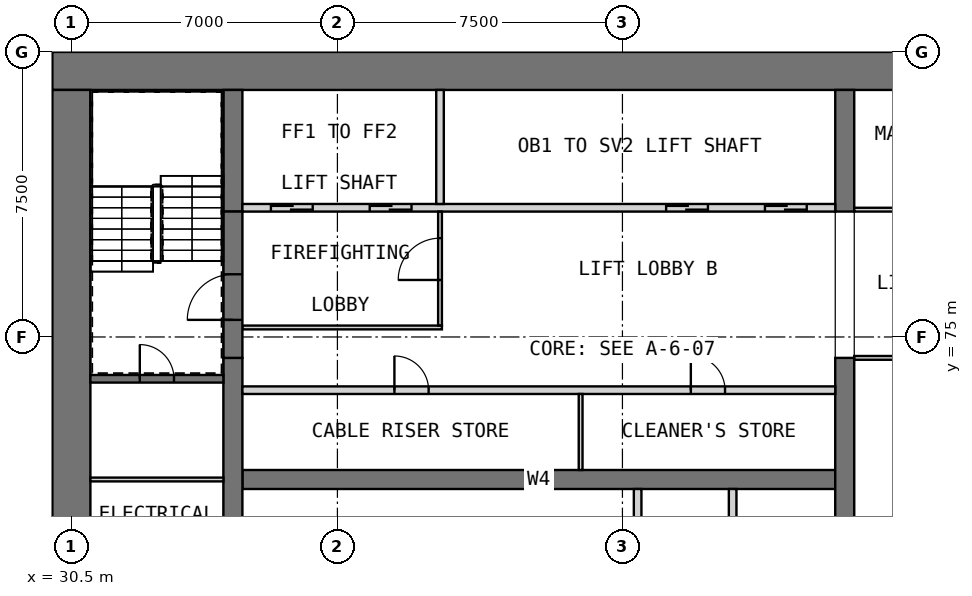
"""IFC4 building model, lengths in metres.
Left out: names, types, materials, properties, quantities, classifications, styles, units other than length and angle.
Written with IfcOpenShell. Run it as: python <this file> out.ifc"""

import sys

from ifc_helpers import new_model, si_unit, direction, frame, frame_2d, origin, place, context, subcontext, project, spatial, rectangle, extrude, element, fill, save


model = new_model("IFC4")
c1 = context("Model", 3, precision=1e-05, world=origin(), true_north=direction((0.0, 1.0)))
c2 = subcontext(c1, "Body", "Model", "MODEL_VIEW")
j1 = project(units=[si_unit("LENGTHUNIT", "METRE"), si_unit("PLANEANGLEUNIT", "RADIAN")], contexts=[c1])
p1 = place(None, origin())
s1 = spatial("IfcSite", under=j1, at=p1, CompositionType="ELEMENT")
p2 = place(p1, origin())
s2 = spatial("IfcBuilding", under=s1, at=p2, CompositionType="ELEMENT")
p3 = place(p2, frame((0.0, 0.0, 23.5)))
s3 = spatial("IfcBuildingStorey", under=s2, at=p3, CompositionType="ELEMENT", Elevation=23.5)
p4 = place(p3, frame((30.0, 82.0, 0.0), z_axis=(0.0, 0.0, 1.0), x_axis=(1.0, 0.0, 0.0)))
e1 = element("IfcWall", 1, at=p4, inside=s3, PredefinedType="SHEAR", context=c2, shape_type="SweptSolid", body=[
    extrude(rectangle(XDim=30.0, YDim=1.0, at=frame_2d((15.0, 0.0))), origin(), (0.0, 0.0, 1.0), 5.5),
])
p5 = place(p3, frame((30.5, 61.0, 0.0), z_axis=(0.0, 0.0, 1.0), x_axis=(0.0, 1.0, 0.0)))
e2 = element("IfcWall", 2, at=p5, inside=s3, PredefinedType="SHEAR", context=c2, shape_type="SweptSolid", body=[
    extrude(rectangle(XDim=20.5, YDim=1.0, at=frame_2d((10.25, 0.0))), origin(), (0.0, 0.0, 1.0), 5.5),
])
p6 = place(p3, frame((35.0, 71.25, 0.0), z_axis=(0.0, 0.0, 1.0), x_axis=(1.0, 0.0, 0.0)))
e3 = element("IfcWall", 3, at=p6, inside=s3, PredefinedType="SHEAR", context=c2, shape_type="SweptSolid", body=[
    extrude(rectangle(XDim=15.6, YDim=0.5, at=frame_2d((7.8, 0.0))), origin(), (0.0, 0.0, 1.0), 5.5),
])
p7 = place(p3, frame((34.75, 68.05, 0.0), z_axis=(0.0, 0.0, 1.0), x_axis=(0.0, 1.0, 0.0)))
e4 = element("IfcWall", 4, at=p7, inside=s3, PredefinedType="SHEAR", context=c2, shape_type="SweptSolid", body=[
    extrude(rectangle(XDim=6.4, YDim=0.5, at=frame_2d((3.2, 0.0))), origin(), (0.0, 0.0, 1.0), 5.5),
])
p8 = place(p3, frame((34.75, 78.3, 0.0), z_axis=(0.0, 0.0, 1.0), x_axis=(0.0, 1.0, 0.0)))
e5 = element("IfcWall", 5, at=p8, inside=s3, PredefinedType="SHEAR", context=c2, shape_type="SweptSolid", body=[
    extrude(rectangle(XDim=3.2, YDim=0.5, at=frame_2d((1.6, 0.0))), origin(), (0.0, 0.0, 1.0), 5.5),
])
p9 = place(p3, frame((50.85, 68.05, 0.0), z_axis=(0.0, 0.0, 1.0), x_axis=(0.0, 1.0, 0.0)))
e6 = element("IfcWall", 6, at=p9, inside=s3, PredefinedType="SHEAR", context=c2, shape_type="SweptSolid", body=[
    extrude(rectangle(XDim=6.4, YDim=0.5, at=frame_2d((3.2, 0.0))), origin(), (0.0, 0.0, 1.0), 5.5),
])
p10 = place(p3, frame((50.85, 78.3, 0.0), z_axis=(0.0, 0.0, 1.0), x_axis=(0.0, 1.0, 0.0)))
e7 = element("IfcWall", 7, at=p10, inside=s3, PredefinedType="SHEAR", context=c2, shape_type="SweptSolid", body=[
    extrude(rectangle(XDim=3.2, YDim=0.5, at=frame_2d((1.6, 0.0))), origin(), (0.0, 0.0, 1.0), 5.5),
])
for number, where, z_axis, x_axis in (
    (8, (45.4, 68.25, 0.0), (0.0, 0.0, 1.0), (0.0, 1.0, 0.0)),
    (9, (47.9, 68.25, 0.0), (0.0, 0.0, 1.0), (0.0, 1.0, 0.0)),
):
    element("IfcWall", number, at=place(p3, frame(where, z_axis=z_axis, x_axis=x_axis)), inside=s3, PredefinedType="SOLIDWALL", context=c2, shape_type="SweptSolid", body=[
        extrude(rectangle(XDim=2.75, YDim=0.2, at=frame_2d((1.375, 0.0))), origin(), (0.0, 0.0, 1.0), 5.5),
    ])
p11 = place(p3, frame((35.0, 73.6, 0.0), z_axis=(0.0, 0.0, 1.0), x_axis=(1.0, 0.0, 0.0)))
e10 = element("IfcWall", 10, at=p11, inside=s3, PredefinedType="PARTITIONING", context=c2, shape_type="SweptSolid", body=[
    extrude(rectangle(XDim=15.6, YDim=0.2, at=frame_2d((7.8, 0.0))), origin(), (0.0, 0.0, 1.0), 5.2),
])
p12 = place(p11, frame((4.0, 0.0, 0.0)))
e11 = element("IfcOpeningElement", 11, at=p12, cuts=e10, PredefinedType="OPENING", context=c2, shape_type="SweptSolid", body=[
    extrude(rectangle(XDim=0.9, YDim=2.1, at=frame_2d((0.45, 1.05))), frame((0.0, 0.11, 0.0), z_axis=(0.0, -1.0, 0.0), x_axis=(1.0, 0.0, 0.0)), (0.0, 0.0, 1.0), 0.22),
])
p13 = place(p11, frame((11.8, 0.0, 0.0)))
e12 = element("IfcOpeningElement", 12, at=p13, cuts=e10, PredefinedType="OPENING", context=c2, shape_type="SweptSolid", body=[
    extrude(rectangle(XDim=0.9, YDim=2.1, at=frame_2d((0.45, 1.05))), frame((0.0, 0.11, 0.0), z_axis=(0.0, -1.0, 0.0), x_axis=(1.0, 0.0, 0.0)), (0.0, 0.0, 1.0), 0.22),
])
p14 = place(p3, frame((43.9, 71.5, 0.0), z_axis=(0.0, 0.0, 1.0), x_axis=(0.0, 1.0, 0.0)))
e13 = element("IfcWall", 13, at=p14, inside=s3, PredefinedType="PARTITIONING", context=c2, shape_type="SweptSolid", body=[
    extrude(rectangle(XDim=2.0, YDim=0.1, at=frame_2d((1.0, 0.0))), origin(), (0.0, 0.0, 1.0), 5.2),
])
p15 = place(p3, frame((35.0, 78.4, 0.0), z_axis=(0.0, 0.0, 1.0), x_axis=(1.0, 0.0, 0.0)))
e14 = element("IfcWall", 14, at=p15, inside=s3, PredefinedType="SOLIDWALL", context=c2, shape_type="SweptSolid", body=[
    extrude(rectangle(XDim=15.6, YDim=0.2, at=frame_2d((7.8, 0.0))), origin(), (0.0, 0.0, 1.0), 5.5),
])
p16 = place(p15, frame((0.75, 0.0, 0.0)))
e15 = element("IfcOpeningElement", 15, at=p16, cuts=e14, PredefinedType="OPENING", context=c2, shape_type="SweptSolid", body=[
    extrude(rectangle(XDim=1.1, YDim=2.1, at=frame_2d((0.55, 1.05))), frame((0.0, 0.11, 0.0), z_axis=(0.0, -1.0, 0.0), x_axis=(1.0, 0.0, 0.0)), (0.0, 0.0, 1.0), 0.22),
])
p17 = place(p15, frame((3.35, 0.0, 0.0)))
e16 = element("IfcOpeningElement", 16, at=p17, cuts=e14, PredefinedType="OPENING", context=c2, shape_type="SweptSolid", body=[
    extrude(rectangle(XDim=1.1, YDim=2.1, at=frame_2d((0.55, 1.05))), frame((0.0, 0.11, 0.0), z_axis=(0.0, -1.0, 0.0), x_axis=(1.0, 0.0, 0.0)), (0.0, 0.0, 1.0), 0.22),
])
p18 = place(p15, frame((11.15, 0.0, 0.0)))
e17 = element("IfcOpeningElement", 17, at=p18, cuts=e14, PredefinedType="OPENING", context=c2, shape_type="SweptSolid", body=[
    extrude(rectangle(XDim=1.1, YDim=2.1, at=frame_2d((0.55, 1.05))), frame((0.0, 0.11, 0.0), z_axis=(0.0, -1.0, 0.0), x_axis=(1.0, 0.0, 0.0)), (0.0, 0.0, 1.0), 0.22),
])
p19 = place(p15, frame((13.75, 0.0, 0.0)))
e18 = element("IfcOpeningElement", 18, at=p19, cuts=e14, PredefinedType="OPENING", context=c2, shape_type="SweptSolid", body=[
    extrude(rectangle(XDim=1.1, YDim=2.1, at=frame_2d((0.55, 1.05))), frame((0.0, 0.11, 0.0), z_axis=(0.0, -1.0, 0.0), x_axis=(1.0, 0.0, 0.0)), (0.0, 0.0, 1.0), 0.22),
])
p20 = place(p3, frame((40.2, 78.5, 0.0), z_axis=(0.0, 0.0, 1.0), x_axis=(0.0, 1.0, 0.0)))
e19 = element("IfcWall", 19, at=p20, inside=s3, PredefinedType="SOLIDWALL", context=c2, shape_type="SweptSolid", body=[
    extrude(rectangle(XDim=3.0, YDim=0.2, at=frame_2d((1.5, 0.0))), origin(), (0.0, 0.0, 1.0), 5.5),
])
p21 = place(p3, frame((35.0, 75.25, 0.0), z_axis=(0.0, 0.0, 1.0), x_axis=(1.0, 0.0, 0.0)))
e20 = element("IfcWall", 20, at=p21, inside=s3, PredefinedType="PARTITIONING", context=c2, shape_type="SweptSolid", body=[
    extrude(rectangle(XDim=5.25, YDim=0.1, at=frame_2d((2.625, 0.0))), origin(), (0.0, 0.0, 1.0), 5.2),
])
p22 = place(p3, frame((40.2, 75.3, 0.0), z_axis=(0.0, 0.0, 1.0), x_axis=(0.0, 1.0, 0.0)))
e21 = element("IfcWall", 21, at=p22, inside=s3, PredefinedType="PARTITIONING", context=c2, shape_type="SweptSolid", body=[
    extrude(rectangle(XDim=3.0, YDim=0.1, at=frame_2d((1.5, 0.0))), origin(), (0.0, 0.0, 1.0), 5.2),
])
p23 = place(p22, frame((1.2, 0.0, 0.0)))
e22 = element("IfcOpeningElement", 22, at=p23, cuts=e21, PredefinedType="OPENING", context=c2, shape_type="SweptSolid", body=[
    extrude(rectangle(XDim=1.1, YDim=2.1, at=frame_2d((0.55, 1.05))), frame((0.0, 0.06, 0.0), z_axis=(0.0, -1.0, 0.0), x_axis=(1.0, 0.0, 0.0)), (0.0, 0.0, 1.0), 0.12),
])
p24 = place(p3, frame((34.75, 74.45, 0.0), z_axis=(0.0, 0.0, 1.0), x_axis=(0.0, 1.0, 0.0)))
e23 = element("IfcWall", 23, at=p24, inside=s3, PredefinedType="SOLIDWALL", context=c2, shape_type="SweptSolid", body=[
    extrude(rectangle(XDim=3.85, YDim=0.5, at=frame_2d((1.925, 0.0))), origin(), (0.0, 0.0, 1.0), 4.3),
])
p25 = place(p24, frame((1.0, 0.0, 0.0)))
e24 = element("IfcOpeningElement", 24, at=p25, cuts=e23, PredefinedType="OPENING", context=c2, shape_type="SweptSolid", body=[
    extrude(rectangle(XDim=1.2, YDim=2.1, at=frame_2d((0.6, 1.05))), frame((0.0, 0.26, 0.0), z_axis=(0.0, -1.0, 0.0), x_axis=(1.0, 0.0, 0.0)), (0.0, 0.0, 1.0), 0.52),
])
p26 = place(p3, frame((31.0, 73.9, 0.0), z_axis=(0.0, 0.0, 1.0), x_axis=(1.0, 0.0, 0.0)))
e25 = element("IfcWall", 25, at=p26, inside=s3, PredefinedType="SOLIDWALL", context=c2, shape_type="SweptSolid", body=[
    extrude(rectangle(XDim=3.5, YDim=0.2, at=frame_2d((1.75, 0.0))), origin(), (0.0, 0.0, 1.0), 5.2),
])
p27 = place(p26, frame((1.3, 0.0, 0.0)))
e26 = element("IfcOpeningElement", 26, at=p27, cuts=e25, PredefinedType="OPENING", context=c2, shape_type="SweptSolid", body=[
    extrude(rectangle(XDim=0.9, YDim=2.1, at=frame_2d((0.45, 1.05))), frame((0.0, 0.11, 0.0), z_axis=(0.0, -1.0, 0.0), x_axis=(1.0, 0.0, 0.0)), (0.0, 0.0, 1.0), 0.22),
])
p28 = place(p3, frame((31.0, 71.25, 0.0), z_axis=(0.0, 0.0, 1.0), x_axis=(1.0, 0.0, 0.0)))
e27 = element("IfcWall", 27, at=p28, inside=s3, PredefinedType="PARTITIONING", context=c2, shape_type="SweptSolid", body=[
    extrude(rectangle(XDim=3.5, YDim=0.1, at=frame_2d((1.75, 0.0))), origin(), (0.0, 0.0, 1.0), 5.2),
])
p29 = place(p3, frame((51.1, 74.45, 0.0), z_axis=(0.0, 0.0, 1.0), x_axis=(1.0, 0.0, 0.0)))
e28 = element("IfcWall", 28, at=p29, inside=s3, PredefinedType="PARTITIONING", context=c2, shape_type="SweptSolid", body=[
    extrude(rectangle(XDim=7.9, YDim=0.1, at=frame_2d((3.95, 0.0))), origin(), (0.0, 0.0, 1.0), 5.2),
])
p30 = place(p29, frame((3.5, 0.0, 0.0)))
e29 = element("IfcOpeningElement", 29, at=p30, cuts=e28, PredefinedType="OPENING", context=c2, shape_type="SweptSolid", body=[
    extrude(rectangle(XDim=0.9, YDim=2.1, at=frame_2d((0.45, 1.05))), frame((0.0, 0.06, 0.0), z_axis=(0.0, -1.0, 0.0), x_axis=(1.0, 0.0, 0.0)), (0.0, 0.0, 1.0), 0.12),
])
p31 = place(p3, frame((51.1, 78.35, 0.0), z_axis=(0.0, 0.0, 1.0), x_axis=(1.0, 0.0, 0.0)))
e30 = element("IfcWall", 30, at=p31, inside=s3, PredefinedType="PARTITIONING", context=c2, shape_type="SweptSolid", body=[
    extrude(rectangle(XDim=7.9, YDim=0.1, at=frame_2d((3.95, 0.0))), origin(), (0.0, 0.0, 1.0), 5.2),
])
p32 = place(p31, frame((1.8, 0.0, 0.0)))
e31 = element("IfcOpeningElement", 31, at=p32, cuts=e30, PredefinedType="OPENING", context=c2, shape_type="SweptSolid", body=[
    extrude(rectangle(XDim=0.9, YDim=2.1, at=frame_2d((0.45, 1.05))), frame((0.0, 0.06, 0.0), z_axis=(0.0, -1.0, 0.0), x_axis=(1.0, 0.0, 0.0)), (0.0, 0.0, 1.0), 0.12),
])
p33 = place(p31, frame((5.75, 0.0, 0.0)))
e32 = element("IfcOpeningElement", 32, at=p33, cuts=e30, PredefinedType="OPENING", context=c2, shape_type="SweptSolid", body=[
    extrude(rectangle(XDim=0.9, YDim=2.1, at=frame_2d((0.45, 1.05))), frame((0.0, 0.06, 0.0), z_axis=(0.0, -1.0, 0.0), x_axis=(1.0, 0.0, 0.0)), (0.0, 0.0, 1.0), 0.12),
])
p34 = place(p12, origin())
e33 = element("IfcDoor", 33, at=p34, inside=s3, OperationType="SINGLE_SWING_RIGHT", PredefinedType="DOOR", context=c2, shape_type="SweptSolid", body=[
    extrude(rectangle(XDim=0.9, YDim=2.1, at=frame_2d((0.45, 1.05))), frame((0.0, 0.025, 0.0), z_axis=(0.0, -1.0, 0.0), x_axis=(1.0, 0.0, 0.0)), (0.0, 0.0, 1.0), 0.05),
])
fill(e11, e33)
p35 = place(p13, origin())
e34 = element("IfcDoor", 34, at=p35, inside=s3, OperationType="SINGLE_SWING_LEFT", PredefinedType="DOOR", context=c2, shape_type="SweptSolid", body=[
    extrude(rectangle(XDim=0.9, YDim=2.1, at=frame_2d((0.45, 1.05))), frame((0.0, 0.025, 0.0), z_axis=(0.0, -1.0, 0.0), x_axis=(1.0, 0.0, 0.0)), (0.0, 0.0, 1.0), 0.05),
])
fill(e12, e34)
p36 = place(p16, origin())
e35 = element("IfcDoor", 35, at=p36, inside=s3, OperationType="DOUBLE_DOOR_SLIDING", PredefinedType="DOOR", context=c2, shape_type="SweptSolid", body=[
    extrude(rectangle(XDim=1.1, YDim=2.1, at=frame_2d((0.55, 1.05))), frame((0.0, 0.025, 0.0), z_axis=(0.0, -1.0, 0.0), x_axis=(1.0, 0.0, 0.0)), (0.0, 0.0, 1.0), 0.05),
])
fill(e15, e35)
p37 = place(p17, origin())
e36 = element("IfcDoor", 36, at=p37, inside=s3, OperationType="DOUBLE_DOOR_SLIDING", PredefinedType="DOOR", context=c2, shape_type="SweptSolid", body=[
    extrude(rectangle(XDim=1.1, YDim=2.1, at=frame_2d((0.55, 1.05))), frame((0.0, 0.025, 0.0), z_axis=(0.0, -1.0, 0.0), x_axis=(1.0, 0.0, 0.0)), (0.0, 0.0, 1.0), 0.05),
])
fill(e16, e36)
p38 = place(p18, origin())
e37 = element("IfcDoor", 37, at=p38, inside=s3, OperationType="DOUBLE_DOOR_SLIDING", PredefinedType="DOOR", context=c2, shape_type="SweptSolid", body=[
    extrude(rectangle(XDim=1.1, YDim=2.1, at=frame_2d((0.55, 1.05))), frame((0.0, 0.025, 0.0), z_axis=(0.0, -1.0, 0.0), x_axis=(1.0, 0.0, 0.0)), (0.0, 0.0, 1.0), 0.05),
])
fill(e17, e37)
p39 = place(p19, origin())
e38 = element("IfcDoor", 38, at=p39, inside=s3, OperationType="DOUBLE_DOOR_SLIDING", PredefinedType="DOOR", context=c2, shape_type="SweptSolid", body=[
    extrude(rectangle(XDim=1.1, YDim=2.1, at=frame_2d((0.55, 1.05))), frame((0.0, 0.025, 0.0), z_axis=(0.0, -1.0, 0.0), x_axis=(1.0, 0.0, 0.0)), (0.0, 0.0, 1.0), 0.05),
])
fill(e18, e38)
p40 = place(p23, origin())
e39 = element("IfcDoor", 39, at=p40, inside=s3, OperationType="SINGLE_SWING_LEFT", PredefinedType="DOOR", context=c2, shape_type="SweptSolid", body=[
    extrude(rectangle(XDim=1.1, YDim=2.1, at=frame_2d((0.55, 1.05))), frame((0.0, 0.025, 0.0), z_axis=(0.0, -1.0, 0.0), x_axis=(1.0, 0.0, 0.0)), (0.0, 0.0, 1.0), 0.05),
])
fill(e22, e39)
p41 = place(p25, origin())
e40 = element("IfcDoor", 40, at=p41, inside=s3, OperationType="SINGLE_SWING_RIGHT", PredefinedType="DOOR", context=c2, shape_type="SweptSolid", body=[
    extrude(rectangle(XDim=1.2, YDim=2.1, at=frame_2d((0.6, 1.05))), frame((0.0, 0.025, 0.0), z_axis=(0.0, -1.0, 0.0), x_axis=(1.0, 0.0, 0.0)), (0.0, 0.0, 1.0), 0.05),
])
fill(e24, e40)
p42 = place(p27, origin())
e41 = element("IfcDoor", 41, at=p42, inside=s3, OperationType="SINGLE_SWING_RIGHT", PredefinedType="DOOR", context=c2, shape_type="SweptSolid", body=[
    extrude(rectangle(XDim=0.9, YDim=2.1, at=frame_2d((0.45, 1.05))), frame((0.0, 0.025, 0.0), z_axis=(0.0, -1.0, 0.0), x_axis=(1.0, 0.0, 0.0)), (0.0, 0.0, 1.0), 0.05),
])
fill(e26, e41)
save(model, sys.argv[1])
